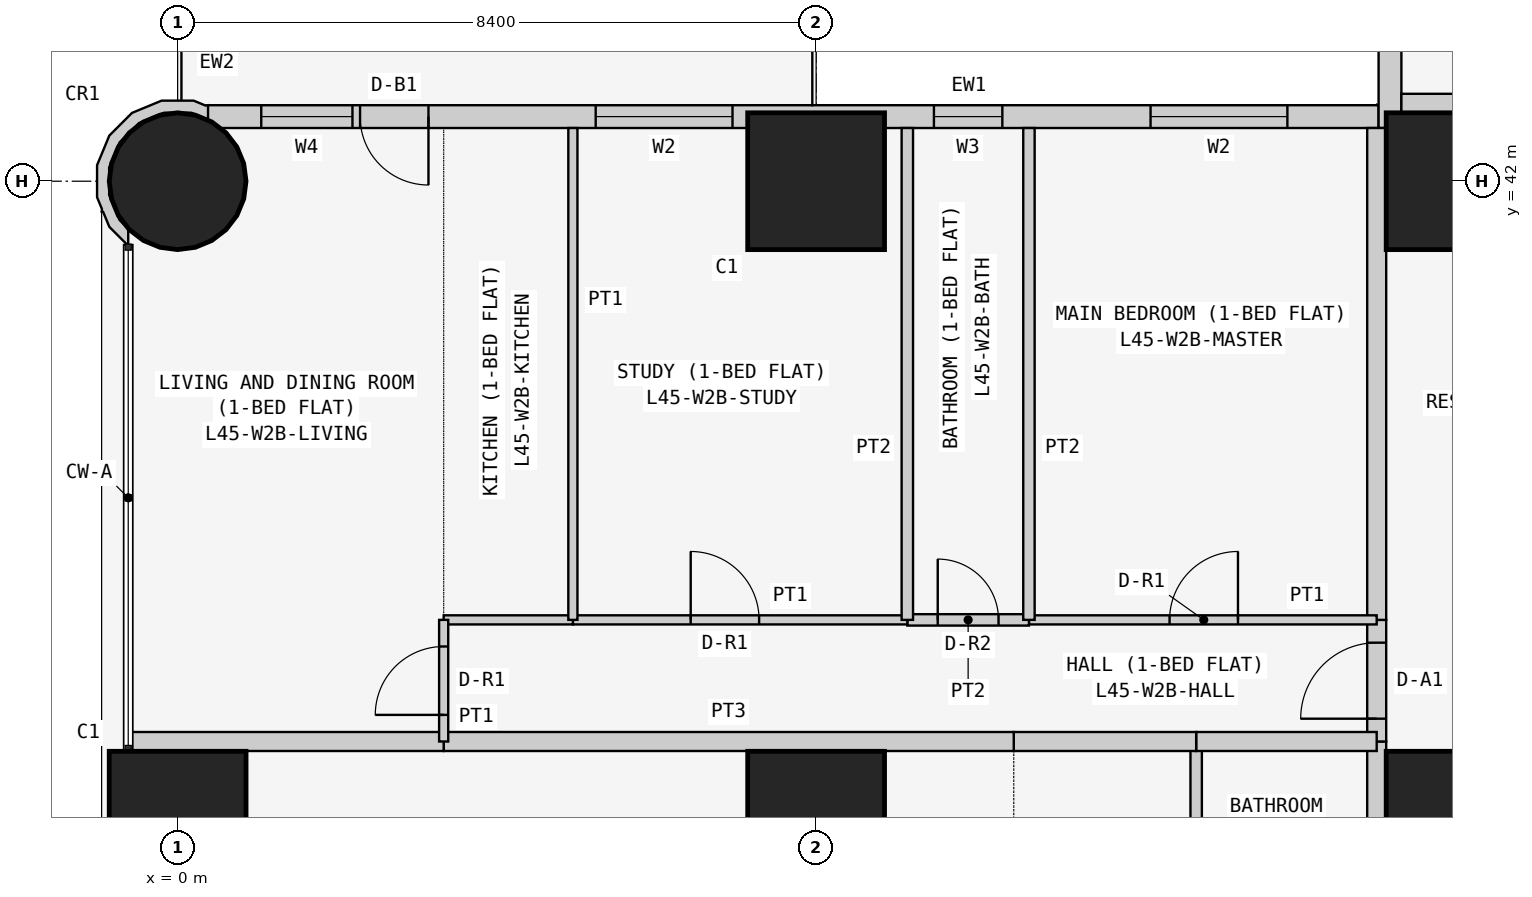
"""IFC4 building model, lengths in metres.
Left out: names, types, materials, properties, quantities, classifications, styles, units other than length and angle.
Written with IfcOpenShell. Run it as: python <this file> out.ifc"""

import sys

from ifc_helpers import new_model, si_unit, direction, frame, frame_2d, origin, origin_2d, place, context, subcontext, project, spatial, polyline, rectangle, circle, outline, extrude, element, fill, save


model = new_model("IFC4")
c1 = context("Model", 3, precision=1e-05, world=origin(), true_north=direction((0.0, 1.0)))
c2 = subcontext(c1, "Body", "Model", "MODEL_VIEW")
j1 = project(units=[si_unit("LENGTHUNIT", "METRE"), si_unit("PLANEANGLEUNIT", "RADIAN")], contexts=[c1])
p1 = place(None, origin())
s1 = spatial("IfcSite", under=j1, at=p1, CompositionType="ELEMENT")
p2 = place(p1, origin())
s2 = spatial("IfcBuilding", under=s1, at=p2, CompositionType="ELEMENT")
p3 = place(p2, frame((0.0, 0.0, 173.7)))
s3 = spatial("IfcBuildingStorey", under=s2, at=p3, CompositionType="ELEMENT", Elevation=173.7)
p4 = place(p3, frame((0.0, 33.6, 0.0), z_axis=(0.0, 0.0, 1.0), x_axis=(1.0, 0.0, 0.0)))
e1 = element("IfcColumn", 1, at=p4, inside=s3, PredefinedType="COLUMN", context=c2, shape_type="SweptSolid", body=[
    extrude(rectangle(XDim=1.8, YDim=1.8, at=origin_2d()), origin(), (0.0, 0.0, 1.0), 3.6),
])
p5 = place(p3, frame((0.0, 42.0, 0.0), z_axis=(0.0, 0.0, 1.0), x_axis=(1.0, 0.0, 0.0)))
e2 = element("IfcColumn", 2, at=p5, inside=s3, PredefinedType="COLUMN", context=c2, shape_type="SweptSolid", body=[
    extrude(circle(Radius=0.9, at=origin_2d()), origin(), (0.0, 0.0, 1.0), 3.6),
])
for number, where, z_axis, x_axis in (
    (3, (8.4, 33.6, 0.0), (0.0, 0.0, 1.0), (1.0, 0.0, 0.0)),
    (4, (8.4, 42.0, 0.0), (0.0, 0.0, 1.0), (1.0, 0.0, 0.0)),
    (5, (16.8, 33.6, 0.0), (0.0, 0.0, 1.0), (1.0, 0.0, 0.0)),
    (6, (16.8, 42.0, 0.0), (0.0, 0.0, 1.0), (1.0, 0.0, 0.0)),
):
    element("IfcColumn", number, at=place(p3, frame(where, z_axis=z_axis, x_axis=x_axis)), inside=s3, PredefinedType="COLUMN", context=c2, shape_type="SweptSolid", body=[
        extrude(rectangle(XDim=1.8, YDim=1.8, at=origin_2d()), origin(), (0.0, 0.0, 1.0), 3.6),
    ])
p6 = place(p3, frame((15.8, 42.85, 0.0), z_axis=(0.0, 0.0, 1.0), x_axis=(-1.0, 0.0, 0.0)))
e7 = element("IfcWall", 7, at=p6, inside=s3, PredefinedType="SOLIDWALL", context=c2, shape_type="SweptSolid", body=[
    extrude(rectangle(XDim=15.4, YDim=0.3, at=frame_2d((7.7, 0.0))), origin(), (0.0, 0.0, 1.0), 3.35),
])
p7 = place(p6, frame((1.2, 0.0, 0.9)))
e8 = element("IfcOpeningElement", 8, at=p7, cuts=e7, PredefinedType="OPENING", context=c2, shape_type="SweptSolid", body=[
    extrude(rectangle(XDim=1.8, YDim=1.5, at=frame_2d((0.9, 0.75))), frame((0.0, 0.16, 0.0), z_axis=(0.0, -1.0, 0.0), x_axis=(1.0, 0.0, 0.0)), (0.0, 0.0, 1.0), 0.32),
])
p8 = place(p6, frame((4.95, 0.0, 1.5)))
e9 = element("IfcOpeningElement", 9, at=p8, cuts=e7, PredefinedType="OPENING", context=c2, shape_type="SweptSolid", body=[
    extrude(rectangle(XDim=0.9, YDim=0.7, at=frame_2d((0.45, 0.35))), frame((0.0, 0.16, 0.0), z_axis=(0.0, -1.0, 0.0), x_axis=(1.0, 0.0, 0.0)), (0.0, 0.0, 1.0), 0.32),
])
p9 = place(p6, frame((8.5, 0.0, 0.9)))
e10 = element("IfcOpeningElement", 10, at=p9, cuts=e7, PredefinedType="OPENING", context=c2, shape_type="SweptSolid", body=[
    extrude(rectangle(XDim=1.8, YDim=1.5, at=frame_2d((0.9, 0.75))), frame((0.0, 0.16, 0.0), z_axis=(0.0, -1.0, 0.0), x_axis=(1.0, 0.0, 0.0)), (0.0, 0.0, 1.0), 0.32),
])
p10 = place(p6, frame((12.5, 0.0, 0.0)))
e11 = element("IfcOpeningElement", 11, at=p10, cuts=e7, PredefinedType="OPENING", context=c2, shape_type="SweptSolid", body=[
    extrude(rectangle(XDim=0.9, YDim=2.4, at=frame_2d((0.45, 1.2))), frame((0.0, 0.16, 0.0), z_axis=(0.0, -1.0, 0.0), x_axis=(1.0, 0.0, 0.0)), (0.0, 0.0, 1.0), 0.32),
])
p11 = place(p6, frame((13.5, 0.0, 0.9)))
e12 = element("IfcOpeningElement", 12, at=p11, cuts=e7, PredefinedType="OPENING", context=c2, shape_type="SweptSolid", body=[
    extrude(rectangle(XDim=1.2, YDim=1.5, at=frame_2d((0.6, 0.75))), frame((0.0, 0.16, 0.0), z_axis=(0.0, -1.0, 0.0), x_axis=(1.0, 0.0, 0.0)), (0.0, 0.0, 1.0), 0.32),
])
p12 = place(p3, frame((15.95, 50.0, 0.0), z_axis=(0.0, 0.0, 1.0), x_axis=(0.0, -1.0, 0.0)))
e13 = element("IfcWall", 13, at=p12, inside=s3, PredefinedType="SOLIDWALL", context=c2, shape_type="SweptSolid", body=[
    extrude(rectangle(XDim=7.3, YDim=0.3, at=frame_2d((3.65, 0.0))), origin(), (0.0, 0.0, 1.0), 3.35),
])
p13 = place(p12, frame((3.1, 0.0, 0.9)))
e14 = element("IfcOpeningElement", 14, at=p13, cuts=e13, PredefinedType="OPENING", context=c2, shape_type="SweptSolid", body=[
    extrude(rectangle(XDim=2.4, YDim=1.5, at=frame_2d((1.2, 0.75))), frame((0.0, 0.16, 0.0), z_axis=(0.0, -1.0, 0.0), x_axis=(1.0, 0.0, 0.0)), (0.0, 0.0, 1.0), 0.32),
])
p14 = place(p12, frame((0.75, 0.0, 0.9)))
e15 = element("IfcOpeningElement", 15, at=p14, cuts=e13, PredefinedType="OPENING", context=c2, shape_type="SweptSolid", body=[
    extrude(rectangle(XDim=1.2, YDim=1.5, at=frame_2d((0.6, 0.75))), frame((0.0, 0.16, 0.0), z_axis=(0.0, -1.0, 0.0), x_axis=(1.0, 0.0, 0.0)), (0.0, 0.0, 1.0), 0.32),
])
p15 = place(p3, frame((0.364, 42.91, 0.0), z_axis=(0.0, 0.0, 1.0), x_axis=(-0.926129809145, 0.377204953059, 0.0)))
e16 = element("IfcWall", 16, at=p15, inside=s3, PredefinedType="SOLIDWALL", context=c2, shape_type="SweptSolid", body=[
    extrude(outline(polyline([(0.36, 1.803), (0.509, 1.741), (0.761, 1.486), (0.896, 1.154), (0.894, 0.795), (0.755, 0.465), (0.5, 0.213), (0.168, 0.078), (-0.1, 0.08), (0.001, -0.097), (0.03, -0.08), (0.199, -0.081), (0.589, 0.078), (0.889, 0.374), (1.053, 0.763), (1.055, 1.185), (0.896, 1.575), (0.778, 1.695), (0.769, 1.728), (0.75, 1.723), (0.6, 1.875), (0.295, 2.003), (0.281, 1.998), (0.36, 1.803)])), origin(), (0.0, 0.0, 1.0), 3.35),
])
p16 = place(p3, frame((16.1, 43.025, 0.0), z_axis=(0.0, 0.0, 1.0), x_axis=(1.0, 0.0, 0.0)))
e17 = element("IfcWall", 17, at=p16, inside=s3, PredefinedType="PARTITIONING", context=c2, shape_type="SweptSolid", body=[
    extrude(rectangle(XDim=6.471, YDim=0.25, at=frame_2d((3.235, 0.0))), origin(), (0.0, 0.0, 1.0), 3.35),
])
p17 = place(p3, frame((15.775, 32.0, 0.0), z_axis=(0.0, 0.0, 1.0), x_axis=(0.0, 1.0, 0.0)))
e18 = element("IfcWall", 18, at=p17, inside=s3, PredefinedType="PARTITIONING", context=c2, shape_type="SweptSolid", body=[
    extrude(rectangle(XDim=2.629, YDim=0.25, at=frame_2d((1.314, 0.0))), origin(), (0.0, 0.0, 1.0), 3.35),
])
p18 = place(p3, frame((15.775, 34.629, 0.0), z_axis=(0.0, 0.0, 1.0), x_axis=(0.0, 1.0, 0.0)))
e19 = element("IfcWall", 19, at=p18, inside=s3, PredefinedType="PARTITIONING", context=c2, shape_type="SweptSolid", body=[
    extrude(rectangle(XDim=1.6, YDim=0.25, at=frame_2d((0.8, 0.0))), origin(), (0.0, 0.0, 1.0), 3.35),
])
p19 = place(p18, frame((0.3, 0.0, 0.0)))
e20 = element("IfcOpeningElement", 20, at=p19, cuts=e19, PredefinedType="OPENING", context=c2, shape_type="SweptSolid", body=[
    extrude(rectangle(XDim=1.0, YDim=2.1, at=frame_2d((0.5, 1.05))), frame((0.0, 0.135, 0.0), z_axis=(0.0, -1.0, 0.0), x_axis=(1.0, 0.0, 0.0)), (0.0, 0.0, 1.0), 0.27),
])
p20 = place(p3, frame((15.775, 36.229, 0.0), z_axis=(0.0, 0.0, 1.0), x_axis=(0.0, 1.0, 0.0)))
e21 = element("IfcWall", 21, at=p20, inside=s3, PredefinedType="PARTITIONING", context=c2, shape_type="SweptSolid", body=[
    extrude(rectangle(XDim=6.471, YDim=0.25, at=frame_2d((3.235, 0.0))), origin(), (0.0, 0.0, 1.0), 3.35),
])
p21 = place(p3, frame((13.4, 32.0, 0.0), z_axis=(0.0, 0.0, 1.0), x_axis=(0.0, 1.0, 0.0)))
e22 = element("IfcWall", 22, at=p21, inside=s3, PredefinedType="PARTITIONING", context=c2, shape_type="SweptSolid", body=[
    extrude(rectangle(XDim=2.629, YDim=0.15, at=frame_2d((1.314, 0.0))), origin(), (0.0, 0.0, 1.0), 3.35),
])
p22 = place(p3, frame((13.4, 34.629, 0.0), z_axis=(0.0, 0.0, 1.0), x_axis=(1.0, 0.0, 0.0)))
e23 = element("IfcWall", 23, at=p22, inside=s3, PredefinedType="PARTITIONING", context=c2, shape_type="SweptSolid", body=[
    extrude(rectangle(XDim=2.375, YDim=0.25, at=frame_2d((1.188, 0.0))), origin(), (0.0, 0.0, 1.0), 3.35),
])
p23 = place(p3, frame((11.0, 34.629, 0.0), z_axis=(0.0, 0.0, 1.0), x_axis=(1.0, 0.0, 0.0)))
e24 = element("IfcWall", 24, at=p23, inside=s3, PredefinedType="PARTITIONING", context=c2, shape_type="SweptSolid", body=[
    extrude(rectangle(XDim=2.4, YDim=0.25, at=frame_2d((1.2, 0.0))), origin(), (0.0, 0.0, 1.0), 3.35),
])
p24 = place(p3, frame((3.5, 34.629, 0.0), z_axis=(0.0, 0.0, 1.0), x_axis=(1.0, 0.0, 0.0)))
e25 = element("IfcWall", 25, at=p24, inside=s3, PredefinedType="PARTITIONING", context=c2, shape_type="SweptSolid", body=[
    extrude(rectangle(XDim=7.5, YDim=0.25, at=frame_2d((3.75, 0.0))), origin(), (0.0, 0.0, 1.0), 3.35),
])
p25 = place(p3, frame((-0.65, 34.629, 0.0), z_axis=(0.0, 0.0, 1.0), x_axis=(1.0, 0.0, 0.0)))
e26 = element("IfcWall", 26, at=p25, inside=s3, PredefinedType="PARTITIONING", context=c2, shape_type="SweptSolid", body=[
    extrude(rectangle(XDim=4.15, YDim=0.25, at=frame_2d((2.075, 0.0))), origin(), (0.0, 0.0, 1.0), 3.35),
])
p26 = place(p3, frame((11.2, 36.229, 0.0), z_axis=(0.0, 0.0, 1.0), x_axis=(1.0, 0.0, 0.0)))
e27 = element("IfcWall", 27, at=p26, inside=s3, PredefinedType="PARTITIONING", context=c2, shape_type="SweptSolid", body=[
    extrude(rectangle(XDim=4.575, YDim=0.12, at=frame_2d((2.288, 0.0))), origin(), (0.0, 0.0, 1.0), 3.35),
])
p27 = place(p26, frame((1.85, 0.0, 0.0)))
e28 = element("IfcOpeningElement", 28, at=p27, cuts=e27, PredefinedType="OPENING", context=c2, shape_type="SweptSolid", body=[
    extrude(rectangle(XDim=0.9, YDim=2.1, at=frame_2d((0.45, 1.05))), frame((0.0, 0.07, 0.0), z_axis=(0.0, -1.0, 0.0), x_axis=(1.0, 0.0, 0.0)), (0.0, 0.0, 1.0), 0.14),
])
p28 = place(p3, frame((9.6, 36.229, 0.0), z_axis=(0.0, 0.0, 1.0), x_axis=(1.0, 0.0, 0.0)))
e29 = element("IfcWall", 29, at=p28, inside=s3, PredefinedType="PARTITIONING", context=c2, shape_type="SweptSolid", body=[
    extrude(rectangle(XDim=1.6, YDim=0.15, at=frame_2d((0.8, 0.0))), origin(), (0.0, 0.0, 1.0), 3.35),
])
p29 = place(p28, frame((0.4, 0.0, 0.0)))
e30 = element("IfcOpeningElement", 30, at=p29, cuts=e29, PredefinedType="OPENING", context=c2, shape_type="SweptSolid", body=[
    extrude(rectangle(XDim=0.8, YDim=2.1, at=frame_2d((0.4, 1.05))), frame((0.0, 0.085, 0.0), z_axis=(0.0, -1.0, 0.0), x_axis=(1.0, 0.0, 0.0)), (0.0, 0.0, 1.0), 0.17),
])
p30 = place(p3, frame((5.2, 36.229, 0.0), z_axis=(0.0, 0.0, 1.0), x_axis=(1.0, 0.0, 0.0)))
e31 = element("IfcWall", 31, at=p30, inside=s3, PredefinedType="PARTITIONING", context=c2, shape_type="SweptSolid", body=[
    extrude(rectangle(XDim=4.4, YDim=0.12, at=frame_2d((2.2, 0.0))), origin(), (0.0, 0.0, 1.0), 3.35),
])
p31 = place(p30, frame((1.55, 0.0, 0.0)))
e32 = element("IfcOpeningElement", 32, at=p31, cuts=e31, PredefinedType="OPENING", context=c2, shape_type="SweptSolid", body=[
    extrude(rectangle(XDim=0.9, YDim=2.1, at=frame_2d((0.45, 1.05))), frame((0.0, 0.07, 0.0), z_axis=(0.0, -1.0, 0.0), x_axis=(1.0, 0.0, 0.0)), (0.0, 0.0, 1.0), 0.14),
])
p32 = place(p3, frame((3.5, 36.229, 0.0), z_axis=(0.0, 0.0, 1.0), x_axis=(1.0, 0.0, 0.0)))
e33 = element("IfcWall", 33, at=p32, inside=s3, PredefinedType="PARTITIONING", context=c2, shape_type="SweptSolid", body=[
    extrude(rectangle(XDim=1.7, YDim=0.12, at=frame_2d((0.85, 0.0))), origin(), (0.0, 0.0, 1.0), 3.35),
])
p33 = place(p3, frame((3.5, 34.629, 0.0), z_axis=(0.0, 0.0, 1.0), x_axis=(0.0, 1.0, 0.0)))
e34 = element("IfcWall", 34, at=p33, inside=s3, PredefinedType="PARTITIONING", context=c2, shape_type="SweptSolid", body=[
    extrude(rectangle(XDim=1.6, YDim=0.12, at=frame_2d((0.8, 0.0))), origin(), (0.0, 0.0, 1.0), 3.35),
])
p34 = place(p33, frame((0.35, 0.0, 0.0)))
e35 = element("IfcOpeningElement", 35, at=p34, cuts=e34, PredefinedType="OPENING", context=c2, shape_type="SweptSolid", body=[
    extrude(rectangle(XDim=0.9, YDim=2.1, at=frame_2d((0.45, 1.05))), frame((0.0, 0.07, 0.0), z_axis=(0.0, -1.0, 0.0), x_axis=(1.0, 0.0, 0.0)), (0.0, 0.0, 1.0), 0.14),
])
for number, where, z_axis, x_axis in (
    (36, (11.2, 36.229, 0.0), (0.0, 0.0, 1.0), (0.0, 1.0, 0.0)),
    (37, (9.6, 36.229, 0.0), (0.0, 0.0, 1.0), (0.0, 1.0, 0.0)),
):
    element("IfcWall", number, at=place(p3, frame(where, z_axis=z_axis, x_axis=x_axis)), inside=s3, PredefinedType="PARTITIONING", context=c2, shape_type="SweptSolid", body=[
        extrude(rectangle(XDim=6.471, YDim=0.15, at=frame_2d((3.235, 0.0))), origin(), (0.0, 0.0, 1.0), 3.35),
    ])
p35 = place(p3, frame((5.2, 36.229, 0.0), z_axis=(0.0, 0.0, 1.0), x_axis=(0.0, 1.0, 0.0)))
e38 = element("IfcWall", 38, at=p35, inside=s3, PredefinedType="PARTITIONING", context=c2, shape_type="SweptSolid", body=[
    extrude(rectangle(XDim=6.471, YDim=0.12, at=frame_2d((3.235, 0.0))), origin(), (0.0, 0.0, 1.0), 3.35),
])
p36 = place(p7, origin())
e39 = element("IfcWindow", 39, at=p36, inside=s3, PartitioningType="SINGLE_PANEL", PredefinedType="WINDOW", context=c2, shape_type="SweptSolid", body=[
    extrude(rectangle(XDim=1.8, YDim=1.5, at=frame_2d((0.9, 0.75))), frame((0.0, 0.03, 0.0), z_axis=(0.0, -1.0, 0.0), x_axis=(1.0, 0.0, 0.0)), (0.0, 0.0, 1.0), 0.06),
])
fill(e8, e39)
p37 = place(p8, origin())
e40 = element("IfcWindow", 40, at=p37, inside=s3, PartitioningType="SINGLE_PANEL", PredefinedType="WINDOW", context=c2, shape_type="SweptSolid", body=[
    extrude(rectangle(XDim=0.9, YDim=0.7, at=frame_2d((0.45, 0.35))), frame((0.0, 0.03, 0.0), z_axis=(0.0, -1.0, 0.0), x_axis=(1.0, 0.0, 0.0)), (0.0, 0.0, 1.0), 0.06),
])
fill(e9, e40)
p38 = place(p9, origin())
e41 = element("IfcWindow", 41, at=p38, inside=s3, PartitioningType="SINGLE_PANEL", PredefinedType="WINDOW", context=c2, shape_type="SweptSolid", body=[
    extrude(rectangle(XDim=1.8, YDim=1.5, at=frame_2d((0.9, 0.75))), frame((0.0, 0.03, 0.0), z_axis=(0.0, -1.0, 0.0), x_axis=(1.0, 0.0, 0.0)), (0.0, 0.0, 1.0), 0.06),
])
fill(e10, e41)
p39 = place(p10, origin())
e42 = element("IfcDoor", 42, at=p39, inside=s3, OperationType="SINGLE_SWING_LEFT", PredefinedType="DOOR", context=c2, shape_type="SweptSolid", body=[
    extrude(rectangle(XDim=0.9, YDim=2.4, at=frame_2d((0.45, 1.2))), frame((0.0, 0.025, 0.0), z_axis=(0.0, -1.0, 0.0), x_axis=(1.0, 0.0, 0.0)), (0.0, 0.0, 1.0), 0.05),
])
fill(e11, e42)
p40 = place(p11, origin())
e43 = element("IfcWindow", 43, at=p40, inside=s3, PartitioningType="SINGLE_PANEL", PredefinedType="WINDOW", context=c2, shape_type="SweptSolid", body=[
    extrude(rectangle(XDim=1.2, YDim=1.5, at=frame_2d((0.6, 0.75))), frame((0.0, 0.03, 0.0), z_axis=(0.0, -1.0, 0.0), x_axis=(1.0, 0.0, 0.0)), (0.0, 0.0, 1.0), 0.06),
])
fill(e12, e43)
p41 = place(p19, origin())
e44 = element("IfcDoor", 44, at=p41, inside=s3, OperationType="SINGLE_SWING_LEFT", PredefinedType="DOOR", context=c2, shape_type="SweptSolid", body=[
    extrude(rectangle(XDim=1.0, YDim=2.1, at=frame_2d((0.5, 1.05))), frame((0.0, 0.025, 0.0), z_axis=(0.0, -1.0, 0.0), x_axis=(1.0, 0.0, 0.0)), (0.0, 0.0, 1.0), 0.05),
])
fill(e20, e44)
p42 = place(p27, origin())
e45 = element("IfcDoor", 45, at=p42, inside=s3, OperationType="SINGLE_SWING_RIGHT", PredefinedType="DOOR", context=c2, shape_type="SweptSolid", body=[
    extrude(rectangle(XDim=0.9, YDim=2.1, at=frame_2d((0.45, 1.05))), frame((0.0, 0.025, 0.0), z_axis=(0.0, -1.0, 0.0), x_axis=(1.0, 0.0, 0.0)), (0.0, 0.0, 1.0), 0.05),
])
fill(e28, e45)
p43 = place(p29, origin())
e46 = element("IfcDoor", 46, at=p43, inside=s3, OperationType="SINGLE_SWING_LEFT", PredefinedType="DOOR", context=c2, shape_type="SweptSolid", body=[
    extrude(rectangle(XDim=0.8, YDim=2.1, at=frame_2d((0.4, 1.05))), frame((0.0, 0.025, 0.0), z_axis=(0.0, -1.0, 0.0), x_axis=(1.0, 0.0, 0.0)), (0.0, 0.0, 1.0), 0.05),
])
fill(e30, e46)
p44 = place(p31, origin())
e47 = element("IfcDoor", 47, at=p44, inside=s3, OperationType="SINGLE_SWING_LEFT", PredefinedType="DOOR", context=c2, shape_type="SweptSolid", body=[
    extrude(rectangle(XDim=0.9, YDim=2.1, at=frame_2d((0.45, 1.05))), frame((0.0, 0.025, 0.0), z_axis=(0.0, -1.0, 0.0), x_axis=(1.0, 0.0, 0.0)), (0.0, 0.0, 1.0), 0.05),
])
fill(e32, e47)
p45 = place(p34, origin())
e48 = element("IfcDoor", 48, at=p45, inside=s3, OperationType="SINGLE_SWING_LEFT", PredefinedType="DOOR", context=c2, shape_type="SweptSolid", body=[
    extrude(rectangle(XDim=0.9, YDim=2.1, at=frame_2d((0.45, 1.05))), frame((0.0, 0.025, 0.0), z_axis=(0.0, -1.0, 0.0), x_axis=(1.0, 0.0, 0.0)), (0.0, 0.0, 1.0), 0.05),
])
fill(e35, e48)
save(model, sys.argv[1])
